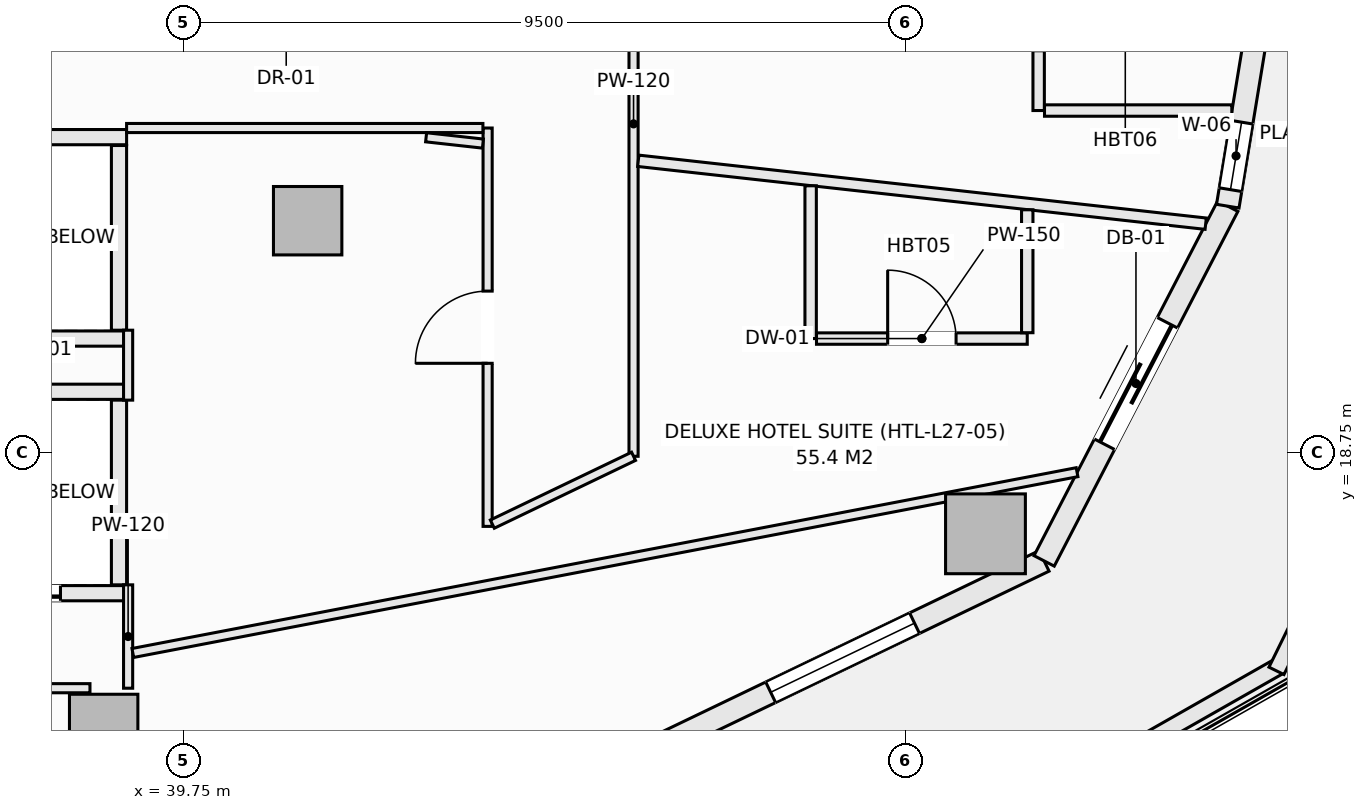
"""IFC4 building model, lengths in metres.
Left out: names, types, materials, properties, quantities, classifications, styles, units other than length and angle.
Written with IfcOpenShell. Run it as: python <this file> out.ifc"""

import sys

from ifc_helpers import new_model, si_unit, direction, frame, frame_2d, origin, origin_2d, place, context, subcontext, project, spatial, rectangle, extrude, element, fill, save


model = new_model("IFC4")
c1 = context("Model", 3, precision=1e-05, world=origin(), true_north=direction((0.0, 1.0)))
c2 = subcontext(c1, "Body", "Model", "MODEL_VIEW")
j1 = project(units=[si_unit("LENGTHUNIT", "METRE"), si_unit("PLANEANGLEUNIT", "RADIAN")], contexts=[c1])
p1 = place(None, origin())
s1 = spatial("IfcSite", under=j1, at=p1, CompositionType="ELEMENT")
p2 = place(p1, origin())
s2 = spatial("IfcBuilding", under=s1, at=p2, CompositionType="ELEMENT")
p3 = place(p2, frame((0.0, 0.0, 112.1)))
s3 = spatial("IfcBuildingStorey", under=s2, at=p3, CompositionType="ELEMENT", Elevation=112.1)
p4 = place(p3, frame((50.3, 17.681, -0.27), z_axis=(0.0, 0.0, 1.0), x_axis=(1.0, 0.0, 0.0)))
e1 = element("IfcColumn", 1, at=p4, inside=s3, PredefinedType="COLUMN", context=c2, shape_type="SweptSolid", body=[
    extrude(rectangle(XDim=1.05, YDim=1.05, at=origin_2d()), origin(), (0.0, 0.0, 1.0), 3.4),
])
for number, where, z_axis, x_axis in (
    (2, (38.698, 15.121, -0.27), (0.0, 0.0, 1.0), (1.0, 0.0, 0.0)),
    (3, (41.382, 21.801, -0.27), (0.0, 0.0, 1.0), (1.0, 0.0, 0.0)),
):
    element("IfcColumn", number, at=place(p3, frame(where, z_axis=z_axis, x_axis=x_axis)), inside=s3, PredefinedType="COLUMN", context=c2, shape_type="SweptSolid", body=[
        extrude(rectangle(XDim=0.9, YDim=0.9, at=origin_2d()), origin(), (0.0, 0.0, 1.0), 3.4),
    ])
p5 = place(p3, frame((45.769, 14.777, 0.0), z_axis=(0.0, 0.0, 1.0), x_axis=(0.901370184739, 0.433049408339, 0.0)))
e4 = element("IfcWall", 4, at=p5, inside=s3, PredefinedType="SOLIDWALL", context=c2, shape_type="SweptSolid", body=[
    extrude(rectangle(XDim=5.884, YDim=0.3, at=frame_2d((2.942, 0.0))), origin(), (0.0, 0.0, 1.0), 2.653),
])
p6 = place(p5, frame((1.892, 0.0, 0.74)))
e5 = element("IfcOpeningElement", 5, at=p6, cuts=e4, PredefinedType="OPENING", context=c2, shape_type="SweptSolid", body=[
    extrude(rectangle(XDim=2.1, YDim=1.7, at=frame_2d((1.05, 0.85))), frame((0.0, 0.16, 0.0), z_axis=(0.0, -1.0, 0.0), x_axis=(1.0, 0.0, 0.0)), (0.0, 0.0, 1.0), 0.32),
])
p7 = place(p3, frame((51.072, 17.325, 0.0), z_axis=(0.0, 0.0, 1.0), x_axis=(0.459767899643, 0.888039119892, 0.0)))
e6 = element("IfcWall", 6, at=p7, inside=s3, PredefinedType="SOLIDWALL", context=c2, shape_type="SweptSolid", body=[
    extrude(rectangle(XDim=5.255, YDim=0.3, at=frame_2d((2.628, 0.0))), origin(), (0.0, 0.0, 1.0), 2.653),
])
p8 = place(p7, frame((1.728, 0.0, 0.0)))
e7 = element("IfcOpeningElement", 7, at=p8, cuts=e6, PredefinedType="OPENING", context=c2, shape_type="SweptSolid", body=[
    extrude(rectangle(XDim=1.8, YDim=2.25, at=frame_2d((0.9, 1.125))), frame((0.0, 0.16, 0.0), z_axis=(0.0, -1.0, 0.0), x_axis=(1.0, 0.0, 0.0)), (0.0, 0.0, 1.0), 0.32),
])
p9 = place(p3, frame((53.488, 21.992, 0.0), z_axis=(0.0, 0.0, 1.0), x_axis=(0.162393944769, 0.986726003864, 0.0)))
e8 = element("IfcWall", 8, at=p9, inside=s3, PredefinedType="SOLIDWALL", context=c2, shape_type="SweptSolid", body=[
    extrude(rectangle(XDim=5.075, YDim=0.3, at=frame_2d((2.538, 0.0))), origin(), (0.0, 0.0, 1.0), 2.653),
])
p10 = place(p9, frame((2.58, 0.0, 0.72)))
e9 = element("IfcOpeningElement", 9, at=p10, cuts=e8, PredefinedType="OPENING", context=c2, shape_type="SweptSolid", body=[
    extrude(rectangle(XDim=1.2, YDim=1.65, at=frame_2d((0.6, 0.825))), frame((0.0, 0.16, 0.0), z_axis=(0.0, -1.0, 0.0), x_axis=(1.0, 0.0, 0.0)), (0.0, 0.0, 1.0), 0.32),
])
p11 = place(p9, frame((0.22, 0.0, 0.72)))
e10 = element("IfcOpeningElement", 10, at=p11, cuts=e8, PredefinedType="OPENING", context=c2, shape_type="SweptSolid", body=[
    extrude(rectangle(XDim=0.9, YDim=1.65, at=frame_2d((0.45, 0.825))), frame((0.0, 0.16, 0.0), z_axis=(0.0, -1.0, 0.0), x_axis=(1.0, 0.0, 0.0)), (0.0, 0.0, 1.0), 0.32),
])
p12 = place(p3, frame((48.413, 12.668, 0.0), z_axis=(0.0, 0.0, 1.0), x_axis=(0.869187658335, 0.494482370361, 0.0)))
e11 = element("IfcWall", 11, at=p12, inside=s3, PredefinedType="PARAPET", context=c2, shape_type="SweptSolid", body=[
    extrude(rectangle(XDim=6.606, YDim=0.22, at=frame_2d((3.303, 0.0))), origin(), (0.0, 0.0, 1.0), 0.52),
])
p13 = place(p3, frame((54.129, 15.878, 0.0), z_axis=(0.0, 0.0, 1.0), x_axis=(0.441269631716, 0.897374566235, 0.0)))
e12 = element("IfcWall", 12, at=p13, inside=s3, PredefinedType="PARAPET", context=c2, shape_type="SweptSolid", body=[
    extrude(rectangle(XDim=6.056, YDim=0.22, at=frame_2d((3.028, 0.0))), origin(), (0.0, 0.0, 1.0), 0.52),
])
p14 = place(p3, frame((36.75, 19.55, 0.0), z_axis=(0.0, 0.0, 1.0), x_axis=(1.0, 0.0, 0.0)))
e13 = element("IfcWall", 13, at=p14, inside=s3, PredefinedType="SOLIDWALL", context=c2, shape_type="SweptSolid", body=[
    extrude(rectangle(XDim=2.25, YDim=0.2, at=frame_2d((1.125, 0.0))), origin(), (0.0, 0.0, 1.0), 3.13),
])
p15 = place(p3, frame((36.75, 16.9, 0.0), z_axis=(0.0, 0.0, 1.0), x_axis=(1.0, 0.0, 0.0)))
e14 = element("IfcWall", 14, at=p15, inside=s3, PredefinedType="SOLIDWALL", context=c2, shape_type="SweptSolid", body=[
    extrude(rectangle(XDim=2.25, YDim=0.2, at=frame_2d((1.125, 0.0))), origin(), (0.0, 0.0, 1.0), 3.13),
])
p16 = place(p15, frame((0.28, 0.0, 0.0)))
e15 = element("IfcOpeningElement", 15, at=p16, cuts=e14, PredefinedType="OPENING", context=c2, shape_type="SweptSolid", body=[
    extrude(rectangle(XDim=1.1, YDim=2.2, at=frame_2d((0.55, 1.1))), frame((0.0, 0.11, 0.0), z_axis=(0.0, -1.0, 0.0), x_axis=(1.0, 0.0, 0.0)), (0.0, 0.0, 1.0), 0.22),
])
p17 = place(p3, frame((38.9, 17.01, 0.0), z_axis=(0.0, 0.0, 1.0), x_axis=(0.0, 1.0, 0.0)))
e16 = element("IfcWall", 16, at=p17, inside=s3, PredefinedType="SOLIDWALL", context=c2, shape_type="SweptSolid", body=[
    extrude(rectangle(XDim=2.43, YDim=0.2, at=frame_2d((1.215, 0.0))), origin(), (0.0, 0.0, 1.0), 3.13),
])
for number, where, z_axis, x_axis in (
    (17, (36.75, 22.9, 0.0), (0.0, 0.0, 1.0), (1.0, 0.0, 0.0)),
    (18, (36.75, 20.25, 0.0), (0.0, 0.0, 1.0), (1.0, 0.0, 0.0)),
):
    element("IfcWall", number, at=place(p3, frame(where, z_axis=z_axis, x_axis=x_axis)), inside=s3, PredefinedType="SOLIDWALL", context=c2, shape_type="SweptSolid", body=[
        extrude(rectangle(XDim=2.25, YDim=0.2, at=frame_2d((1.125, 0.0))), origin(), (0.0, 0.0, 1.0), 3.13),
    ])
p18 = place(p3, frame((38.9, 20.36, 0.0), z_axis=(0.0, 0.0, 1.0), x_axis=(0.0, 1.0, 0.0)))
e19 = element("IfcWall", 19, at=p18, inside=s3, PredefinedType="SOLIDWALL", context=c2, shape_type="SweptSolid", body=[
    extrude(rectangle(XDim=2.43, YDim=0.2, at=frame_2d((1.215, 0.0))), origin(), (0.0, 0.0, 1.0), 3.13),
])
p19 = place(p3, frame((39.02, 15.65, 0.0), z_axis=(0.0, 0.0, 1.0), x_axis=(0.0, 1.0, 0.0)))
e20 = element("IfcWall", 20, at=p19, inside=s3, PredefinedType="PARTITIONING", context=c2, shape_type="SweptSolid", body=[
    extrude(rectangle(XDim=1.36, YDim=0.12, at=frame_2d((0.68, 0.0))), origin(), (0.0, 0.0, 1.0), 2.505),
])
p20 = place(p3, frame((39.02, 19.44, 0.0), z_axis=(0.0, 0.0, 1.0), x_axis=(0.0, 1.0, 0.0)))
e21 = element("IfcWall", 21, at=p20, inside=s3, PredefinedType="PARTITIONING", context=c2, shape_type="SweptSolid", body=[
    extrude(rectangle(XDim=0.92, YDim=0.12, at=frame_2d((0.46, 0.0))), origin(), (0.0, 0.0, 1.0), 3.13),
])
p21 = place(p3, frame((35.95, 15.65, 0.0), z_axis=(0.0, 0.0, 1.0), x_axis=(1.0, 0.0, 0.0)))
e22 = element("IfcWall", 22, at=p21, inside=s3, PredefinedType="PARTITIONING", context=c2, shape_type="SweptSolid", body=[
    extrude(rectangle(XDim=2.568, YDim=0.12, at=frame_2d((1.284, 0.0))), origin(), (0.0, 0.0, 1.0), 3.13),
])
p22 = place(p3, frame((43.75, 17.779, 0.0), z_axis=(0.0, 0.0, 1.0), x_axis=(0.0, 1.0, 0.0)))
e23 = element("IfcWall", 23, at=p22, inside=s3, PredefinedType="PARTITIONING", context=c2, shape_type="SweptSolid", body=[
    extrude(rectangle(XDim=5.241, YDim=0.12, at=frame_2d((2.621, 0.0))), origin(), (0.0, 0.0, 1.0), 3.13),
])
p23 = place(p22, frame((2.146, 0.0, 0.0)))
e24 = element("IfcOpeningElement", 24, at=p23, cuts=e23, PredefinedType="OPENING", context=c2, shape_type="SweptSolid", body=[
    extrude(rectangle(XDim=0.95, YDim=2.1, at=frame_2d((0.475, 1.05))), frame((0.0, 0.07, 0.0), z_axis=(0.0, -1.0, 0.0), x_axis=(1.0, 0.0, 0.0)), (0.0, 0.0, 1.0), 0.14),
])
p24 = place(p3, frame((45.67, 18.701, 0.0), z_axis=(0.0, 0.0, 1.0), x_axis=(0.0, 1.0, 0.0)))
e25 = element("IfcWall", 25, at=p24, inside=s3, PredefinedType="PARTITIONING", context=c2, shape_type="SweptSolid", body=[
    extrude(rectangle(XDim=8.747, YDim=0.12, at=frame_2d((4.374, 0.0))), origin(), (0.0, 0.0, 1.0), 3.13),
])
p25 = place(p3, frame((43.812, 17.809, 0.0), z_axis=(0.0, 0.0, 1.0), x_axis=(0.901467594949, 0.432846595525, 0.0)))
e26 = element("IfcWall", 26, at=p25, inside=s3, PredefinedType="PARTITIONING", context=c2, shape_type="SweptSolid", body=[
    extrude(rectangle(XDim=2.061, YDim=0.12, at=frame_2d((1.031, 0.0))), origin(), (0.0, 0.0, 1.0), 3.13),
])
p26 = place(p3, frame((39.0, 23.02, 0.0), z_axis=(0.0, 0.0, 1.0), x_axis=(1.0, 0.0, 0.0)))
e27 = element("IfcWall", 27, at=p26, inside=s3, PredefinedType="PARTITIONING", context=c2, shape_type="SweptSolid", body=[
    extrude(rectangle(XDim=4.688, YDim=0.12, at=frame_2d((2.344, 0.0))), origin(), (0.0, 0.0, 1.0), 3.13),
])
p27 = place(p3, frame((42.941, 22.898, 0.0), z_axis=(0.0, 0.0, 1.0), x_axis=(0.993923268999, -0.110075134986, 0.0)))
e28 = element("IfcWall", 28, at=p27, inside=s3, PredefinedType="PARTITIONING", context=c2, shape_type="SweptSolid", body=[
    extrude(rectangle(XDim=0.752, YDim=0.12, at=frame_2d((0.376, 0.0))), origin(), (0.0, 0.0, 1.0), 3.13),
])
p28 = place(p3, frame((45.732, 22.589, 0.0), z_axis=(0.0, 0.0, 1.0), x_axis=(0.993915007742, -0.110149704422, 0.0)))
e29 = element("IfcWall", 29, at=p28, inside=s3, PredefinedType="PARTITIONING", context=c2, shape_type="SweptSolid", body=[
    extrude(rectangle(XDim=7.511, YDim=0.15, at=frame_2d((3.756, 0.0))), origin(), (0.0, 0.0, 1.0), 3.13),
])
p29 = place(p3, frame((39.082, 16.114, 0.0), z_axis=(0.0, 0.0, 1.0), x_axis=(0.982162094293, 0.188036221334, 0.0)))
e30 = element("IfcWall", 30, at=p29, inside=s3, PredefinedType="PARTITIONING", context=c2, shape_type="SweptSolid", body=[
    extrude(rectangle(XDim=12.649, YDim=0.12, at=frame_2d((6.324, 0.0))), origin(), (0.0, 0.0, 1.0), 2.812),
])
p30 = place(p3, frame((48.0, 20.25, 0.0), z_axis=(0.0, 0.0, 1.0), x_axis=(0.0, 1.0, 0.0)))
e31 = element("IfcWall", 31, at=p30, inside=s3, PredefinedType="PARTITIONING", context=c2, shape_type="SweptSolid", body=[
    extrude(rectangle(XDim=2.01, YDim=0.15, at=frame_2d((1.005, 0.0))), origin(), (0.0, 0.0, 1.0), 3.13),
])
p31 = place(p3, frame((48.077, 20.25, 0.0), z_axis=(0.0, 0.0, 1.0), x_axis=(1.0, 0.0, 0.0)))
e32 = element("IfcWall", 32, at=p31, inside=s3, PredefinedType="PARTITIONING", context=c2, shape_type="SweptSolid", body=[
    extrude(rectangle(XDim=2.773, YDim=0.15, at=frame_2d((1.387, 0.0))), origin(), (0.0, 0.0, 1.0), 3.13),
])
p32 = place(p31, frame((0.937, 0.0, 0.0)))
e33 = element("IfcOpeningElement", 33, at=p32, cuts=e32, PredefinedType="OPENING", context=c2, shape_type="SweptSolid", body=[
    extrude(rectangle(XDim=0.9, YDim=2.1, at=frame_2d((0.45, 1.05))), frame((0.0, 0.085, 0.0), z_axis=(0.0, -1.0, 0.0), x_axis=(1.0, 0.0, 0.0)), (0.0, 0.0, 1.0), 0.17),
])
p33 = place(p3, frame((50.85, 20.327, 0.0), z_axis=(0.0, 0.0, 1.0), x_axis=(0.0, 1.0, 0.0)))
e34 = element("IfcWall", 34, at=p33, inside=s3, PredefinedType="PARTITIONING", context=c2, shape_type="SweptSolid", body=[
    extrude(rectangle(XDim=1.617, YDim=0.15, at=frame_2d((0.809, 0.0))), origin(), (0.0, 0.0, 1.0), 3.13),
])
p34 = place(p3, frame((51.0, 23.25, 0.0), z_axis=(0.0, 0.0, 1.0), x_axis=(0.0, 1.0, 0.0)))
e35 = element("IfcWall", 35, at=p34, inside=s3, PredefinedType="PARTITIONING", context=c2, shape_type="SweptSolid", body=[
    extrude(rectangle(XDim=2.473, YDim=0.15, at=frame_2d((1.236, 0.0))), origin(), (0.0, 0.0, 1.0), 3.13),
])
p35 = place(p34, frame((0.787, 0.0, 0.0)))
e36 = element("IfcOpeningElement", 36, at=p35, cuts=e35, PredefinedType="OPENING", context=c2, shape_type="SweptSolid", body=[
    extrude(rectangle(XDim=0.9, YDim=2.1, at=frame_2d((0.45, 1.05))), frame((0.0, 0.085, 0.0), z_axis=(0.0, -1.0, 0.0), x_axis=(1.0, 0.0, 0.0)), (0.0, 0.0, 1.0), 0.17),
])
p36 = place(p3, frame((51.077, 23.25, 0.0), z_axis=(0.0, 0.0, 1.0), x_axis=(1.0, 0.0, 0.0)))
e37 = element("IfcWall", 37, at=p36, inside=s3, PredefinedType="PARTITIONING", context=c2, shape_type="SweptSolid", body=[
    extrude(rectangle(XDim=2.464, YDim=0.15, at=frame_2d((1.232, 0.0))), origin(), (0.0, 0.0, 1.0), 3.13),
])
p37 = place(p6, origin())
e38 = element("IfcWindow", 38, at=p37, inside=s3, PartitioningType="SINGLE_PANEL", PredefinedType="WINDOW", context=c2, shape_type="SweptSolid", body=[
    extrude(rectangle(XDim=2.1, YDim=1.7, at=frame_2d((1.05, 0.85))), frame((0.0, 0.03, 0.0), z_axis=(0.0, -1.0, 0.0), x_axis=(1.0, 0.0, 0.0)), (0.0, 0.0, 1.0), 0.06),
])
fill(e5, e38)
p38 = place(p8, frame((1.8, 0.0, 0.0), z_axis=(0.0, 0.0, 1.0), x_axis=(-1.0, 0.0, 0.0)))
e39 = element("IfcDoor", 39, at=p38, inside=s3, OperationType="SLIDING_TO_LEFT", PredefinedType="DOOR", context=c2, shape_type="SweptSolid", body=[
    extrude(rectangle(XDim=1.8, YDim=2.25, at=frame_2d((0.9, 1.125))), frame((0.0, 0.025, 0.0), z_axis=(0.0, -1.0, 0.0), x_axis=(1.0, 0.0, 0.0)), (0.0, 0.0, 1.0), 0.05),
])
fill(e7, e39)
p39 = place(p16, origin())
e40 = element("IfcDoor", 40, at=p39, inside=s3, OperationType="SLIDING_TO_LEFT", PredefinedType="DOOR", context=c2, shape_type="SweptSolid", body=[
    extrude(rectangle(XDim=1.1, YDim=2.2, at=frame_2d((0.55, 1.1))), frame((0.0, 0.025, 0.0), z_axis=(0.0, -1.0, 0.0), x_axis=(1.0, 0.0, 0.0)), (0.0, 0.0, 1.0), 0.05),
])
fill(e15, e40)
p40 = place(p23, origin())
e41 = element("IfcDoor", 41, at=p40, inside=s3, OperationType="SINGLE_SWING_LEFT", PredefinedType="DOOR", context=c2, shape_type="SweptSolid", body=[
    extrude(rectangle(XDim=0.95, YDim=2.1, at=frame_2d((0.475, 1.05))), frame((0.0, 0.025, 0.0), z_axis=(0.0, -1.0, 0.0), x_axis=(1.0, 0.0, 0.0)), (0.0, 0.0, 1.0), 0.05),
])
fill(e24, e41)
p41 = place(p32, origin())
e42 = element("IfcDoor", 42, at=p41, inside=s3, OperationType="SINGLE_SWING_LEFT", PredefinedType="DOOR", context=c2, shape_type="SweptSolid", body=[
    extrude(rectangle(XDim=0.9, YDim=2.1, at=frame_2d((0.45, 1.05))), frame((0.0, 0.025, 0.0), z_axis=(0.0, -1.0, 0.0), x_axis=(1.0, 0.0, 0.0)), (0.0, 0.0, 1.0), 0.05),
])
fill(e33, e42)
p42 = place(p11, origin())
e43 = element("IfcWindow", 43, at=p42, inside=s3, PartitioningType="SINGLE_PANEL", PredefinedType="WINDOW", context=c2, shape_type="SweptSolid", body=[
    extrude(rectangle(XDim=0.9, YDim=1.65, at=frame_2d((0.45, 0.825))), frame((0.0, 0.03, 0.0), z_axis=(0.0, -1.0, 0.0), x_axis=(1.0, 0.0, 0.0)), (0.0, 0.0, 1.0), 0.06),
])
fill(e10, e43)
save(model, sys.argv[1])
